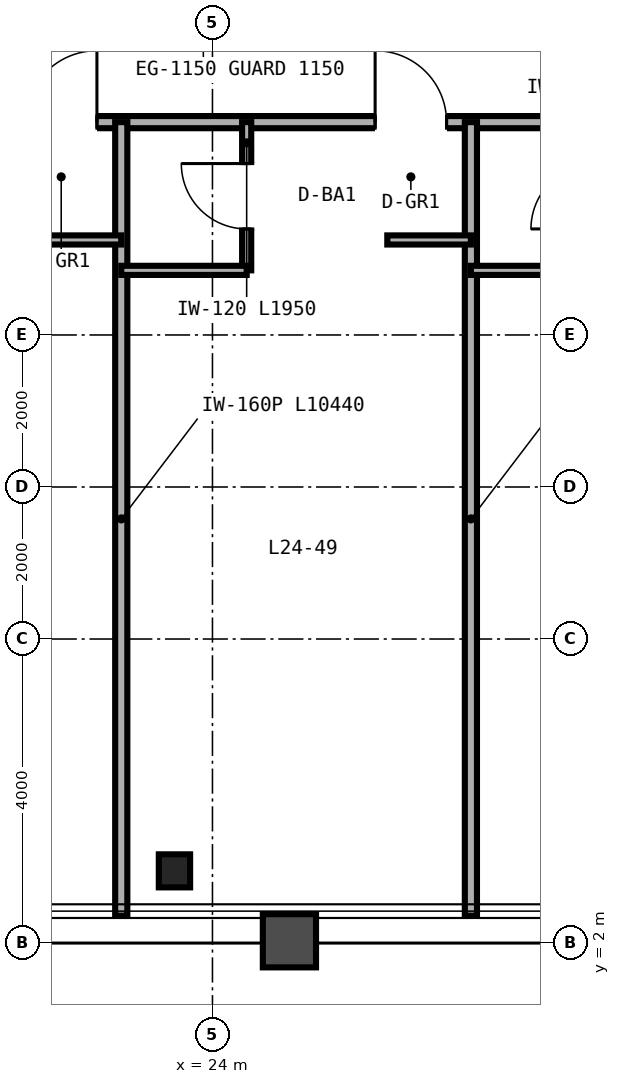
"""IFC4 building model, lengths in metres.
Left out: names, types, materials, properties, quantities, classifications, styles, units other than length and angle.
Written with IfcOpenShell. Run it as: python <this file> out.ifc"""

import sys

from ifc_helpers import new_model, si_unit, direction, frame, frame_2d, origin, origin_2d, place, context, subcontext, project, spatial, rectangle, i_section, extrude, source, transform, mapped, element, fill, save


model = new_model("IFC4")
c1 = context("Model", 3, precision=1e-05, world=origin(), true_north=direction((0.0, 1.0)))
c2 = subcontext(c1, "Body", "Model", "MODEL_VIEW")
j1 = project(units=[si_unit("LENGTHUNIT", "METRE"), si_unit("PLANEANGLEUNIT", "RADIAN")], contexts=[c1])
p1 = place(None, origin())
s1 = spatial("IfcSite", under=j1, at=p1, CompositionType="ELEMENT")
p2 = place(p1, origin())
s2 = spatial("IfcBuilding", under=s1, at=p2, CompositionType="ELEMENT")
p3 = place(p2, frame((0.0, 0.0, 100.8)))
s3 = spatial("IfcBuildingStorey", under=s2, at=p3, CompositionType="ELEMENT", Elevation=100.8)
m1 = source(origin(), c2, "Body", "SweptSolid", [
    extrude(i_section(OverallWidth=0.412, OverallDepth=0.435, WebThickness=0.036, FlangeThickness=0.057, FilletRadius=0.025, at=origin_2d()), origin(), (0.0, 0.0, 1.0), 3.36),
])
p4 = place(p3, frame((23.5, 2.95, 0.0), z_axis=(0.0, 0.0, 1.0), x_axis=(1.0, 0.0, 0.0)))
e1 = element("IfcColumn", 1, at=p4, inside=s3, PredefinedType="COLUMN", context=c2, shape_type="MappedRepresentation", body=[
    mapped(m1, transform((0.0, 0.0, 0.0), scale=1.0)),
])
p5 = place(p3, frame((14.0, 12.8, 0.0), z_axis=(0.0, 0.0, 1.0), x_axis=(1.0, 0.0, 0.0)))
e2 = element("IfcWall", 2, at=p5, inside=s3, PredefinedType="PARTITIONING", context=c2, shape_type="SweptSolid", body=[
    extrude(rectangle(XDim=36.0, YDim=0.16, at=frame_2d((18.0, 0.0))), origin(), (0.0, 0.0, 1.0), 2.581),
])
p6 = place(p5, frame((3.14, 0.0, 0.0)))
e3 = element("IfcOpeningElement", 3, at=p6, cuts=e2, PredefinedType="OPENING", context=c2, shape_type="SweptSolid", body=[
    extrude(rectangle(XDim=0.94, YDim=2.15, at=frame_2d((0.47, 1.075))), frame((0.0, 0.09, 0.0), z_axis=(0.0, -1.0, 0.0), x_axis=(1.0, 0.0, 0.0)), (0.0, 0.0, 1.0), 0.18),
])
p7 = place(p5, frame((7.54, 0.0, 0.0)))
e4 = element("IfcOpeningElement", 4, at=p7, cuts=e2, PredefinedType="OPENING", context=c2, shape_type="SweptSolid", body=[
    extrude(rectangle(XDim=0.94, YDim=2.15, at=frame_2d((0.47, 1.075))), frame((0.0, 0.09, 0.0), z_axis=(0.0, -1.0, 0.0), x_axis=(1.0, 0.0, 0.0)), (0.0, 0.0, 1.0), 0.18),
])
p8 = place(p5, frame((12.14, 0.0, 0.0)))
e5 = element("IfcOpeningElement", 5, at=p8, cuts=e2, PredefinedType="OPENING", context=c2, shape_type="SweptSolid", body=[
    extrude(rectangle(XDim=0.94, YDim=2.15, at=frame_2d((0.47, 1.075))), frame((0.0, 0.09, 0.0), z_axis=(0.0, -1.0, 0.0), x_axis=(1.0, 0.0, 0.0)), (0.0, 0.0, 1.0), 0.18),
])
p9 = place(p5, frame((16.94, 0.0, 0.0)))
e6 = element("IfcOpeningElement", 6, at=p9, cuts=e2, PredefinedType="OPENING", context=c2, shape_type="SweptSolid", body=[
    extrude(rectangle(XDim=0.94, YDim=2.15, at=frame_2d((0.47, 1.075))), frame((0.0, 0.09, 0.0), z_axis=(0.0, -1.0, 0.0), x_axis=(1.0, 0.0, 0.0)), (0.0, 0.0, 1.0), 0.18),
])
p10 = place(p5, frame((21.74, 0.0, 0.0)))
e7 = element("IfcOpeningElement", 7, at=p10, cuts=e2, PredefinedType="OPENING", context=c2, shape_type="SweptSolid", body=[
    extrude(rectangle(XDim=0.94, YDim=2.15, at=frame_2d((0.47, 1.075))), frame((0.0, 0.09, 0.0), z_axis=(0.0, -1.0, 0.0), x_axis=(1.0, 0.0, 0.0)), (0.0, 0.0, 1.0), 0.18),
])
p11 = place(p5, frame((26.34, 0.0, 0.0)))
e8 = element("IfcOpeningElement", 8, at=p11, cuts=e2, PredefinedType="OPENING", context=c2, shape_type="SweptSolid", body=[
    extrude(rectangle(XDim=0.94, YDim=2.15, at=frame_2d((0.47, 1.075))), frame((0.0, 0.09, 0.0), z_axis=(0.0, -1.0, 0.0), x_axis=(1.0, 0.0, 0.0)), (0.0, 0.0, 1.0), 0.18),
])
p12 = place(p5, frame((30.54, 0.0, 0.0)))
e9 = element("IfcOpeningElement", 9, at=p12, cuts=e2, PredefinedType="OPENING", context=c2, shape_type="SweptSolid", body=[
    extrude(rectangle(XDim=0.94, YDim=2.15, at=frame_2d((0.47, 1.075))), frame((0.0, 0.09, 0.0), z_axis=(0.0, -1.0, 0.0), x_axis=(1.0, 0.0, 0.0)), (0.0, 0.0, 1.0), 0.18),
])
p13 = place(p5, frame((34.74, 0.0, 0.0)))
e10 = element("IfcOpeningElement", 10, at=p13, cuts=e2, PredefinedType="OPENING", context=c2, shape_type="SweptSolid", body=[
    extrude(rectangle(XDim=0.94, YDim=2.15, at=frame_2d((0.47, 1.075))), frame((0.0, 0.09, 0.0), z_axis=(0.0, -1.0, 0.0), x_axis=(1.0, 0.0, 0.0)), (0.0, 0.0, 1.0), 0.18),
])
p14 = place(p3, frame((22.8, 2.36, 0.0), z_axis=(0.0, 0.0, 1.0), x_axis=(0.0, 1.0, 0.0)))
e11 = element("IfcWall", 11, at=p14, inside=s3, PredefinedType="PARTITIONING", context=c2, shape_type="SweptSolid", body=[
    extrude(rectangle(XDim=10.44, YDim=0.16, at=frame_2d((5.22, 0.0))), origin(), (0.0, 0.0, 1.0), 2.823),
])
p15 = place(p3, frame((21.7, 11.25, 0.0), z_axis=(0.0, 0.0, 1.0), x_axis=(1.0, 0.0, 0.0)))
e12 = element("IfcWall", 12, at=p15, inside=s3, PredefinedType="PARTITIONING", context=c2, shape_type="SweptSolid", body=[
    extrude(rectangle(XDim=1.1, YDim=0.12, at=frame_2d((0.55, 0.0))), origin(), (0.0, 0.0, 1.0), 3.36),
])
p16 = place(p3, frame((27.4, 2.36, 0.0), z_axis=(0.0, 0.0, 1.0), x_axis=(0.0, 1.0, 0.0)))
e13 = element("IfcWall", 13, at=p16, inside=s3, PredefinedType="PARTITIONING", context=c2, shape_type="SweptSolid", body=[
    extrude(rectangle(XDim=10.44, YDim=0.16, at=frame_2d((5.22, 0.0))), origin(), (0.0, 0.0, 1.0), 2.433),
])
p17 = place(p3, frame((24.45, 10.85, 0.0), z_axis=(0.0, 0.0, 1.0), x_axis=(0.0, 1.0, 0.0)))
e14 = element("IfcWall", 14, at=p17, inside=s3, PredefinedType="PARTITIONING", context=c2, shape_type="SweptSolid", body=[
    extrude(rectangle(XDim=1.95, YDim=0.12, at=frame_2d((0.975, 0.0))), origin(), (0.0, 0.0, 1.0), 3.36),
])
p18 = place(p17, frame((0.545, 0.0, 0.0)))
e15 = element("IfcOpeningElement", 15, at=p18, cuts=e14, PredefinedType="OPENING", context=c2, shape_type="SweptSolid", body=[
    extrude(rectangle(XDim=0.86, YDim=2.1, at=frame_2d((0.43, 1.05))), frame((0.0, 0.07, 0.0), z_axis=(0.0, -1.0, 0.0), x_axis=(1.0, 0.0, 0.0)), (0.0, 0.0, 1.0), 0.14),
])
p19 = place(p3, frame((22.8, 10.85, 0.0), z_axis=(0.0, 0.0, 1.0), x_axis=(1.0, 0.0, 0.0)))
e16 = element("IfcWall", 16, at=p19, inside=s3, PredefinedType="PARTITIONING", context=c2, shape_type="SweptSolid", body=[
    extrude(rectangle(XDim=1.65, YDim=0.12, at=frame_2d((0.825, 0.0))), origin(), (0.0, 0.0, 1.0), 2.581),
])
p20 = place(p3, frame((26.3, 11.25, 0.0), z_axis=(0.0, 0.0, 1.0), x_axis=(1.0, 0.0, 0.0)))
e17 = element("IfcWall", 17, at=p20, inside=s3, PredefinedType="PARTITIONING", context=c2, shape_type="SweptSolid", body=[
    extrude(rectangle(XDim=1.1, YDim=0.12, at=frame_2d((0.55, 0.0))), origin(), (0.0, 0.0, 1.0), 3.36),
])
p21 = place(p3, frame((27.4, 10.85, 0.0), z_axis=(0.0, 0.0, 1.0), x_axis=(1.0, 0.0, 0.0)))
e18 = element("IfcWall", 18, at=p21, inside=s3, PredefinedType="PARTITIONING", context=c2, shape_type="SweptSolid", body=[
    extrude(rectangle(XDim=1.65, YDim=0.12, at=frame_2d((0.825, 0.0))), origin(), (0.0, 0.0, 1.0), 3.36),
])
m2 = source(origin(), c2, "Body", "SweptSolid", [
    extrude(rectangle(XDim=0.86, YDim=2.1, at=frame_2d((0.43, 1.05))), frame((0.0, 0.025, 0.0), z_axis=(0.0, -1.0, 0.0), x_axis=(1.0, 0.0, 0.0)), (0.0, 0.0, 1.0), 0.05),
])
p22 = place(p18, origin())
e19 = element("IfcDoor", 19, at=p22, inside=s3, OperationType="SINGLE_SWING_RIGHT", PredefinedType="DOOR", context=c2, shape_type="MappedRepresentation", body=[
    mapped(m2, transform((0.0, 0.0, 0.0), scale=1.0)),
])
fill(e15, e19)
m3 = source(origin(), c2, "Body", "SweptSolid", [
    extrude(rectangle(XDim=0.94, YDim=2.15, at=frame_2d((0.47, 1.075))), frame((0.0, 0.025, 0.0), z_axis=(0.0, -1.0, 0.0), x_axis=(1.0, 0.0, 0.0)), (0.0, 0.0, 1.0), 0.05),
])
p23 = place(p7, origin())
e20 = element("IfcDoor", 20, at=p23, inside=s3, OperationType="SINGLE_SWING_RIGHT", PredefinedType="DOOR", context=c2, shape_type="MappedRepresentation", body=[
    mapped(m3, transform((0.0, 0.0, 0.0), scale=1.0)),
])
fill(e4, e20)
p24 = place(p8, origin())
e21 = element("IfcDoor", 21, at=p24, inside=s3, OperationType="SINGLE_SWING_LEFT", PredefinedType="DOOR", context=c2, shape_type="MappedRepresentation", body=[
    mapped(m3, transform((0.0, 0.0, 0.0), scale=1.0)),
])
fill(e5, e21)
save(model, sys.argv[1])
